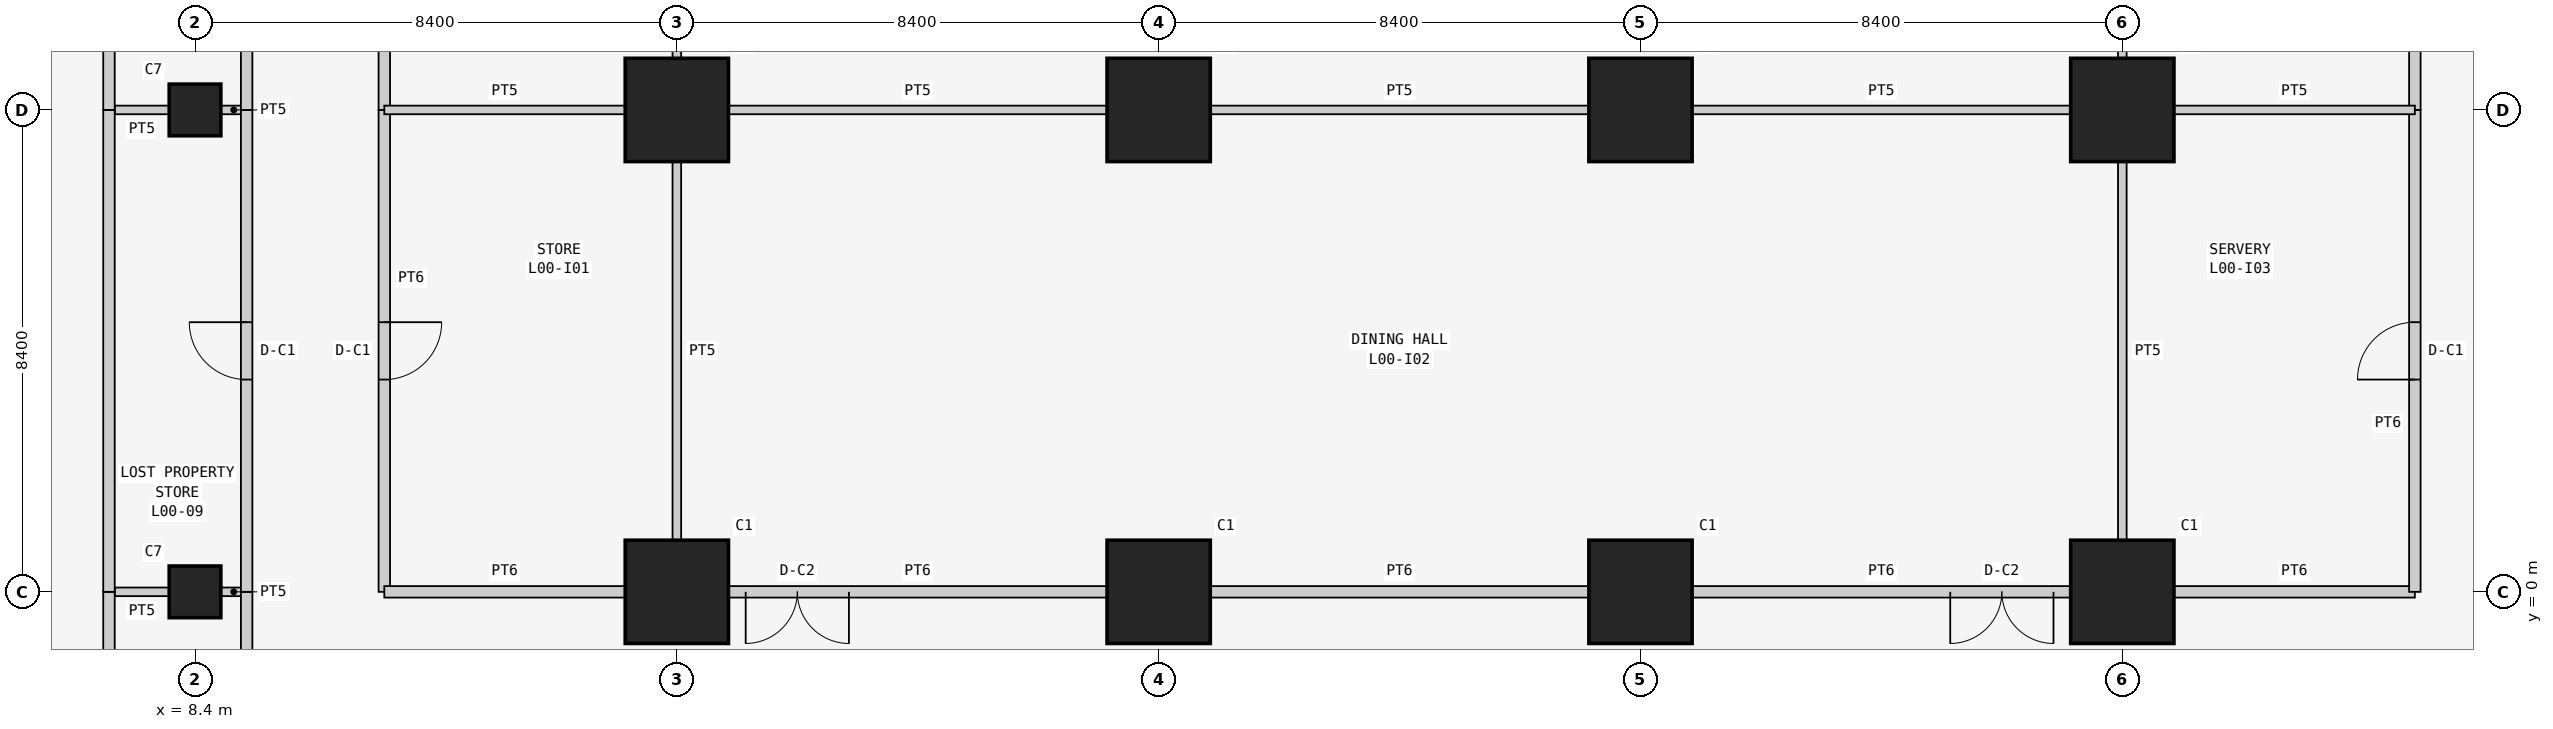
"""IFC4 building model, lengths in metres.
Left out: names, types, materials, properties, quantities, classifications, styles, units other than length and angle.
Written with IfcOpenShell. Run it as: python <this file> out.ifc"""

import sys

from ifc_helpers import new_model, si_unit, direction, frame, frame_2d, origin, origin_2d, place, context, subcontext, project, spatial, rectangle, extrude, element, fill, save


model = new_model("IFC4")
c1 = context("Model", 3, precision=1e-05, world=origin(), true_north=direction((0.0, 1.0)))
c2 = subcontext(c1, "Body", "Model", "MODEL_VIEW")
j1 = project(units=[si_unit("LENGTHUNIT", "METRE"), si_unit("PLANEANGLEUNIT", "RADIAN")], contexts=[c1])
p1 = place(None, origin())
s1 = spatial("IfcSite", under=j1, at=p1, CompositionType="ELEMENT")
p2 = place(p1, origin())
s2 = spatial("IfcBuilding", under=s1, at=p2, CompositionType="ELEMENT")
p3 = place(p2, origin())
s3 = spatial("IfcBuildingStorey", under=s2, at=p3, CompositionType="ELEMENT", Elevation=0.0)
for number, where, z_axis, x_axis in (
    (1, (8.4, 0.0, 0.0), (0.0, 0.0, 1.0), (1.0, 0.0, 0.0)),
    (2, (8.4, 8.4, 0.0), (0.0, 0.0, 1.0), (1.0, 0.0, 0.0)),
):
    element("IfcColumn", number, at=place(p3, frame(where, z_axis=z_axis, x_axis=x_axis)), inside=s3, PredefinedType="COLUMN", context=c2, shape_type="SweptSolid", body=[
        extrude(rectangle(XDim=0.9, YDim=0.9, at=origin_2d()), origin(), (0.0, 0.0, 1.0), 6.0),
    ])
for number, where, z_axis, x_axis in (
    (3, (16.8, 0.0, 0.0), (0.0, 0.0, 1.0), (1.0, 0.0, 0.0)),
    (4, (16.8, 8.4, 0.0), (0.0, 0.0, 1.0), (1.0, 0.0, 0.0)),
    (5, (25.2, 0.0, 0.0), (0.0, 0.0, 1.0), (1.0, 0.0, 0.0)),
    (6, (25.2, 8.4, 0.0), (0.0, 0.0, 1.0), (1.0, 0.0, 0.0)),
    (7, (33.6, 0.0, 0.0), (0.0, 0.0, 1.0), (1.0, 0.0, 0.0)),
    (8, (33.6, 8.4, 0.0), (0.0, 0.0, 1.0), (1.0, 0.0, 0.0)),
    (9, (42.0, 0.0, 0.0), (0.0, 0.0, 1.0), (1.0, 0.0, 0.0)),
    (10, (42.0, 8.4, 0.0), (0.0, 0.0, 1.0), (1.0, 0.0, 0.0)),
):
    element("IfcColumn", number, at=place(p3, frame(where, z_axis=z_axis, x_axis=x_axis)), inside=s3, PredefinedType="COLUMN", context=c2, shape_type="SweptSolid", body=[
        extrude(rectangle(XDim=1.8, YDim=1.8, at=origin_2d()), origin(), (0.0, 0.0, 1.0), 6.0),
    ])
p4 = place(p3, frame((7.0, 0.0, 0.0), z_axis=(0.0, 0.0, 1.0), x_axis=(1.0, 0.0, 0.0)))
e11 = element("IfcWall", 11, at=p4, inside=s3, PredefinedType="PARTITIONING", context=c2, shape_type="SweptSolid", body=[
    extrude(rectangle(XDim=0.95, YDim=0.15, at=frame_2d((0.475, 0.0))), origin(), (0.0, 0.0, 1.0), 5.043),
])
p5 = place(p3, frame((8.85, 0.0, 0.0), z_axis=(0.0, 0.0, 1.0), x_axis=(1.0, 0.0, 0.0)))
e12 = element("IfcWall", 12, at=p5, inside=s3, PredefinedType="PARTITIONING", context=c2, shape_type="SweptSolid", body=[
    extrude(rectangle(XDim=0.45, YDim=0.15, at=frame_2d((0.225, 0.0))), origin(), (0.0, 0.0, 1.0), 5.043),
])
p6 = place(p3, frame((6.9, -8.4, 0.0), z_axis=(0.0, 0.0, 1.0), x_axis=(0.0, 1.0, 0.0)))
e13 = element("IfcWall", 13, at=p6, inside=s3, PredefinedType="PARTITIONING", context=c2, shape_type="SweptSolid", body=[
    extrude(rectangle(XDim=8.4, YDim=0.2, at=frame_2d((4.2, 0.0))), origin(), (0.0, 0.0, 1.0), 5.8),
])
p7 = place(p3, frame((9.3, 0.0, 0.0), z_axis=(0.0, 0.0, 1.0), x_axis=(0.0, -1.0, 0.0)))
e14 = element("IfcWall", 14, at=p7, inside=s3, PredefinedType="PARTITIONING", context=c2, shape_type="SweptSolid", body=[
    extrude(rectangle(XDim=8.4, YDim=0.2, at=frame_2d((4.2, 0.0))), origin(), (0.0, 0.0, 1.0), 5.8),
])
p8 = place(p7, frame((3.7, 0.0, 0.0)))
e15 = element("IfcOpeningElement", 15, at=p8, cuts=e14, PredefinedType="OPENING", context=c2, shape_type="SweptSolid", body=[
    extrude(rectangle(XDim=1.0, YDim=2.1, at=frame_2d((0.5, 1.05))), frame((0.0, 0.11, 0.0), z_axis=(0.0, -1.0, 0.0), x_axis=(1.0, 0.0, 0.0)), (0.0, 0.0, 1.0), 0.22),
])
p9 = place(p3, frame((7.0, 8.4, 0.0), z_axis=(0.0, 0.0, 1.0), x_axis=(1.0, 0.0, 0.0)))
e16 = element("IfcWall", 16, at=p9, inside=s3, PredefinedType="PARTITIONING", context=c2, shape_type="SweptSolid", body=[
    extrude(rectangle(XDim=0.95, YDim=0.15, at=frame_2d((0.475, 0.0))), origin(), (0.0, 0.0, 1.0), 5.043),
])
p10 = place(p3, frame((8.85, 8.4, 0.0), z_axis=(0.0, 0.0, 1.0), x_axis=(1.0, 0.0, 0.0)))
e17 = element("IfcWall", 17, at=p10, inside=s3, PredefinedType="PARTITIONING", context=c2, shape_type="SweptSolid", body=[
    extrude(rectangle(XDim=0.45, YDim=0.15, at=frame_2d((0.225, 0.0))), origin(), (0.0, 0.0, 1.0), 5.043),
])
p11 = place(p3, frame((6.9, 0.0, 0.0), z_axis=(0.0, 0.0, 1.0), x_axis=(0.0, 1.0, 0.0)))
e18 = element("IfcWall", 18, at=p11, inside=s3, PredefinedType="PARTITIONING", context=c2, shape_type="SweptSolid", body=[
    extrude(rectangle(XDim=8.4, YDim=0.2, at=frame_2d((4.2, 0.0))), origin(), (0.0, 0.0, 1.0), 5.8),
])
p12 = place(p3, frame((9.3, 8.4, 0.0), z_axis=(0.0, 0.0, 1.0), x_axis=(0.0, -1.0, 0.0)))
e19 = element("IfcWall", 19, at=p12, inside=s3, PredefinedType="PARTITIONING", context=c2, shape_type="SweptSolid", body=[
    extrude(rectangle(XDim=8.4, YDim=0.2, at=frame_2d((4.2, 0.0))), origin(), (0.0, 0.0, 1.0), 5.8),
])
p13 = place(p12, frame((3.7, 0.0, 0.0)))
e20 = element("IfcOpeningElement", 20, at=p13, cuts=e19, PredefinedType="OPENING", context=c2, shape_type="SweptSolid", body=[
    extrude(rectangle(XDim=1.0, YDim=2.1, at=frame_2d((0.5, 1.05))), frame((0.0, 0.11, 0.0), z_axis=(0.0, -1.0, 0.0), x_axis=(1.0, 0.0, 0.0)), (0.0, 0.0, 1.0), 0.22),
])
p14 = place(p3, frame((6.9, 8.4, 0.0), z_axis=(0.0, 0.0, 1.0), x_axis=(0.0, 1.0, 0.0)))
e21 = element("IfcWall", 21, at=p14, inside=s3, PredefinedType="PARTITIONING", context=c2, shape_type="SweptSolid", body=[
    extrude(rectangle(XDim=4.9, YDim=0.2, at=frame_2d((2.45, 0.0))), origin(), (0.0, 0.0, 1.0), 5.8),
])
p15 = place(p3, frame((9.3, 15.9, 0.0), z_axis=(0.0, 0.0, 1.0), x_axis=(0.0, -1.0, 0.0)))
e22 = element("IfcWall", 22, at=p15, inside=s3, PredefinedType="PARTITIONING", context=c2, shape_type="SweptSolid", body=[
    extrude(rectangle(XDim=7.5, YDim=0.2, at=frame_2d((3.75, 0.0))), origin(), (0.0, 0.0, 1.0), 5.8),
])
p16 = place(p15, frame((3.25, 0.0, 0.0)))
e23 = element("IfcOpeningElement", 23, at=p16, cuts=e22, PredefinedType="OPENING", context=c2, shape_type="SweptSolid", body=[
    extrude(rectangle(XDim=1.0, YDim=2.1, at=frame_2d((0.5, 1.05))), frame((0.0, 0.11, 0.0), z_axis=(0.0, -1.0, 0.0), x_axis=(1.0, 0.0, 0.0)), (0.0, 0.0, 1.0), 0.22),
])
p17 = place(p3, frame((11.7, 8.4, 0.0), z_axis=(0.0, 0.0, 1.0), x_axis=(0.0, -1.0, 0.0)))
e24 = element("IfcWall", 24, at=p17, inside=s3, PredefinedType="PARTITIONING", context=c2, shape_type="SweptSolid", body=[
    extrude(rectangle(XDim=8.4, YDim=0.2, at=frame_2d((4.2, 0.0))), origin(), (0.0, 0.0, 1.0), 5.8),
])
p18 = place(p17, frame((3.7, 0.0, 0.0)))
e25 = element("IfcOpeningElement", 25, at=p18, cuts=e24, PredefinedType="OPENING", context=c2, shape_type="SweptSolid", body=[
    extrude(rectangle(XDim=1.0, YDim=2.1, at=frame_2d((0.5, 1.05))), frame((0.0, 0.11, 0.0), z_axis=(0.0, -1.0, 0.0), x_axis=(1.0, 0.0, 0.0)), (0.0, 0.0, 1.0), 0.22),
])
p19 = place(p3, frame((11.7, 0.0, 0.0), z_axis=(0.0, 0.0, 1.0), x_axis=(1.0, 0.0, 0.0)))
e26 = element("IfcWall", 26, at=p19, inside=s3, PredefinedType="PARTITIONING", context=c2, shape_type="SweptSolid", body=[
    extrude(rectangle(XDim=4.2, YDim=0.2, at=frame_2d((2.1, 0.0))), origin(), (0.0, 0.0, 1.0), 5.043),
])
p20 = place(p3, frame((17.7, 0.0, 0.0), z_axis=(0.0, 0.0, 1.0), x_axis=(1.0, 0.0, 0.0)))
e27 = element("IfcWall", 27, at=p20, inside=s3, PredefinedType="PARTITIONING", context=c2, shape_type="SweptSolid", body=[
    extrude(rectangle(XDim=6.6, YDim=0.2, at=frame_2d((3.3, 0.0))), origin(), (0.0, 0.0, 1.0), 5.043),
])
p21 = place(p20, frame((0.3, 0.0, 0.0)))
e28 = element("IfcOpeningElement", 28, at=p21, cuts=e27, PredefinedType="OPENING", context=c2, shape_type="SweptSolid", body=[
    extrude(rectangle(XDim=1.8, YDim=2.4, at=frame_2d((0.9, 1.2))), frame((0.0, 0.11, 0.0), z_axis=(0.0, -1.0, 0.0), x_axis=(1.0, 0.0, 0.0)), (0.0, 0.0, 1.0), 0.22),
])
p22 = place(p3, frame((26.1, 0.0, 0.0), z_axis=(0.0, 0.0, 1.0), x_axis=(1.0, 0.0, 0.0)))
e29 = element("IfcWall", 29, at=p22, inside=s3, PredefinedType="PARTITIONING", context=c2, shape_type="SweptSolid", body=[
    extrude(rectangle(XDim=6.6, YDim=0.2, at=frame_2d((3.3, 0.0))), origin(), (0.0, 0.0, 1.0), 5.043),
])
p23 = place(p3, frame((34.5, 0.0, 0.0), z_axis=(0.0, 0.0, 1.0), x_axis=(1.0, 0.0, 0.0)))
e30 = element("IfcWall", 30, at=p23, inside=s3, PredefinedType="PARTITIONING", context=c2, shape_type="SweptSolid", body=[
    extrude(rectangle(XDim=6.6, YDim=0.2, at=frame_2d((3.3, 0.0))), origin(), (0.0, 0.0, 1.0), 5.043),
])
p24 = place(p23, frame((4.5, 0.0, 0.0)))
e31 = element("IfcOpeningElement", 31, at=p24, cuts=e30, PredefinedType="OPENING", context=c2, shape_type="SweptSolid", body=[
    extrude(rectangle(XDim=1.8, YDim=2.4, at=frame_2d((0.9, 1.2))), frame((0.0, 0.11, 0.0), z_axis=(0.0, -1.0, 0.0), x_axis=(1.0, 0.0, 0.0)), (0.0, 0.0, 1.0), 0.22),
])
p25 = place(p3, frame((42.9, 0.0, 0.0), z_axis=(0.0, 0.0, 1.0), x_axis=(1.0, 0.0, 0.0)))
e32 = element("IfcWall", 32, at=p25, inside=s3, PredefinedType="PARTITIONING", context=c2, shape_type="SweptSolid", body=[
    extrude(rectangle(XDim=4.2, YDim=0.2, at=frame_2d((2.1, 0.0))), origin(), (0.0, 0.0, 1.0), 5.043),
])
p26 = place(p3, frame((47.1, 0.0, 0.0), z_axis=(0.0, 0.0, 1.0), x_axis=(0.0, 1.0, 0.0)))
e33 = element("IfcWall", 33, at=p26, inside=s3, PredefinedType="PARTITIONING", context=c2, shape_type="SweptSolid", body=[
    extrude(rectangle(XDim=8.4, YDim=0.2, at=frame_2d((4.2, 0.0))), origin(), (0.0, 0.0, 1.0), 5.8),
])
p27 = place(p26, frame((3.7, 0.0, 0.0)))
e34 = element("IfcOpeningElement", 34, at=p27, cuts=e33, PredefinedType="OPENING", context=c2, shape_type="SweptSolid", body=[
    extrude(rectangle(XDim=1.0, YDim=2.1, at=frame_2d((0.5, 1.05))), frame((0.0, 0.11, 0.0), z_axis=(0.0, -1.0, 0.0), x_axis=(1.0, 0.0, 0.0)), (0.0, 0.0, 1.0), 0.22),
])
p28 = place(p3, frame((11.7, 16.8, 0.0), z_axis=(0.0, 0.0, 1.0), x_axis=(0.0, -1.0, 0.0)))
e35 = element("IfcWall", 35, at=p28, inside=s3, PredefinedType="PARTITIONING", context=c2, shape_type="SweptSolid", body=[
    extrude(rectangle(XDim=8.4, YDim=0.2, at=frame_2d((4.2, 0.0))), origin(), (0.0, 0.0, 1.0), 5.8),
])
p29 = place(p28, frame((3.7, 0.0, 0.0)))
e36 = element("IfcOpeningElement", 36, at=p29, cuts=e35, PredefinedType="OPENING", context=c2, shape_type="SweptSolid", body=[
    extrude(rectangle(XDim=1.0, YDim=2.1, at=frame_2d((0.5, 1.05))), frame((0.0, 0.11, 0.0), z_axis=(0.0, -1.0, 0.0), x_axis=(1.0, 0.0, 0.0)), (0.0, 0.0, 1.0), 0.22),
])
p30 = place(p3, frame((47.1, 8.4, 0.0), z_axis=(0.0, 0.0, 1.0), x_axis=(0.0, 1.0, 0.0)))
e37 = element("IfcWall", 37, at=p30, inside=s3, PredefinedType="PARTITIONING", context=c2, shape_type="SweptSolid", body=[
    extrude(rectangle(XDim=8.4, YDim=0.2, at=frame_2d((4.2, 0.0))), origin(), (0.0, 0.0, 1.0), 5.8),
])
p31 = place(p30, frame((3.7, 0.0, 0.0)))
e38 = element("IfcOpeningElement", 38, at=p31, cuts=e37, PredefinedType="OPENING", context=c2, shape_type="SweptSolid", body=[
    extrude(rectangle(XDim=1.0, YDim=2.1, at=frame_2d((0.5, 1.05))), frame((0.0, 0.11, 0.0), z_axis=(0.0, -1.0, 0.0), x_axis=(1.0, 0.0, 0.0)), (0.0, 0.0, 1.0), 0.22),
])
p32 = place(p3, frame((16.8, 7.5, 0.0), z_axis=(0.0, 0.0, 1.0), x_axis=(0.0, -1.0, 0.0)))
e39 = element("IfcWall", 39, at=p32, inside=s3, PredefinedType="PARTITIONING", context=c2, shape_type="SweptSolid", body=[
    extrude(rectangle(XDim=6.6, YDim=0.15, at=frame_2d((3.3, 0.0))), origin(), (0.0, 0.0, 1.0), 5.043),
])
p33 = place(p3, frame((11.7, 8.4, 0.0), z_axis=(0.0, 0.0, 1.0), x_axis=(1.0, 0.0, 0.0)))
e40 = element("IfcWall", 40, at=p33, inside=s3, PredefinedType="PARTITIONING", context=c2, shape_type="SweptSolid", body=[
    extrude(rectangle(XDim=4.2, YDim=0.15, at=frame_2d((2.1, 0.0))), origin(), (0.0, 0.0, 1.0), 5.043),
])
for number, where, z_axis, x_axis in (
    (41, (42.0, 7.5, 0.0), (0.0, 0.0, 1.0), (0.0, -1.0, 0.0)),
    (42, (17.7, 8.4, 0.0), (0.0, 0.0, 1.0), (1.0, 0.0, 0.0)),
):
    element("IfcWall", number, at=place(p3, frame(where, z_axis=z_axis, x_axis=x_axis)), inside=s3, PredefinedType="PARTITIONING", context=c2, shape_type="SweptSolid", body=[
        extrude(rectangle(XDim=6.6, YDim=0.15, at=frame_2d((3.3, 0.0))), origin(), (0.0, 0.0, 1.0), 5.043),
    ])
p34 = place(p3, frame((26.1, 8.4, 0.0), z_axis=(0.0, 0.0, 1.0), x_axis=(1.0, 0.0, 0.0)))
e43 = element("IfcWall", 43, at=p34, inside=s3, PredefinedType="PARTITIONING", context=c2, shape_type="SweptSolid", body=[
    extrude(rectangle(XDim=6.6, YDim=0.15, at=frame_2d((3.3, 0.0))), origin(), (0.0, 0.0, 1.0), 5.043),
])
p35 = place(p3, frame((34.5, 8.4, 0.0), z_axis=(0.0, 0.0, 1.0), x_axis=(1.0, 0.0, 0.0)))
e44 = element("IfcWall", 44, at=p35, inside=s3, PredefinedType="PARTITIONING", context=c2, shape_type="SweptSolid", body=[
    extrude(rectangle(XDim=6.6, YDim=0.15, at=frame_2d((3.3, 0.0))), origin(), (0.0, 0.0, 1.0), 5.043),
])
p36 = place(p3, frame((42.9, 8.4, 0.0), z_axis=(0.0, 0.0, 1.0), x_axis=(1.0, 0.0, 0.0)))
e45 = element("IfcWall", 45, at=p36, inside=s3, PredefinedType="PARTITIONING", context=c2, shape_type="SweptSolid", body=[
    extrude(rectangle(XDim=4.2, YDim=0.15, at=frame_2d((2.1, 0.0))), origin(), (0.0, 0.0, 1.0), 5.043),
])
for number, where, z_axis, x_axis in (
    (46, (16.8, 15.9, 0.0), (0.0, 0.0, 1.0), (0.0, -1.0, 0.0)),
    (47, (42.0, 15.9, 0.0), (0.0, 0.0, 1.0), (0.0, -1.0, 0.0)),
):
    element("IfcWall", number, at=place(p3, frame(where, z_axis=z_axis, x_axis=x_axis)), inside=s3, PredefinedType="PARTITIONING", context=c2, shape_type="SweptSolid", body=[
        extrude(rectangle(XDim=6.6, YDim=0.15, at=frame_2d((3.3, 0.0))), origin(), (0.0, 0.0, 1.0), 5.043),
    ])
p37 = place(p13, frame((1.0, 0.0, 0.0), z_axis=(0.0, 0.0, 1.0), x_axis=(-1.0, 0.0, 0.0)))
e48 = element("IfcDoor", 48, at=p37, inside=s3, OperationType="SINGLE_SWING_RIGHT", PredefinedType="DOOR", context=c2, shape_type="SweptSolid", body=[
    extrude(rectangle(XDim=1.0, YDim=2.1, at=frame_2d((0.5, 1.05))), frame((0.0, 0.025, 0.0), z_axis=(0.0, -1.0, 0.0), x_axis=(1.0, 0.0, 0.0)), (0.0, 0.0, 1.0), 0.05),
])
fill(e20, e48)
p38 = place(p18, origin())
e49 = element("IfcDoor", 49, at=p38, inside=s3, OperationType="SINGLE_SWING_LEFT", PredefinedType="DOOR", context=c2, shape_type="SweptSolid", body=[
    extrude(rectangle(XDim=1.0, YDim=2.1, at=frame_2d((0.5, 1.05))), frame((0.0, 0.025, 0.0), z_axis=(0.0, -1.0, 0.0), x_axis=(1.0, 0.0, 0.0)), (0.0, 0.0, 1.0), 0.05),
])
fill(e25, e49)
p39 = place(p21, frame((1.8, 0.0, 0.0), z_axis=(0.0, 0.0, 1.0), x_axis=(-1.0, 0.0, 0.0)))
e50 = element("IfcDoor", 50, at=p39, inside=s3, OperationType="DOUBLE_DOOR_SINGLE_SWING", PredefinedType="DOOR", context=c2, shape_type="SweptSolid", body=[
    extrude(rectangle(XDim=1.8, YDim=2.4, at=frame_2d((0.9, 1.2))), frame((0.0, 0.025, 0.0), z_axis=(0.0, -1.0, 0.0), x_axis=(1.0, 0.0, 0.0)), (0.0, 0.0, 1.0), 0.05),
])
fill(e28, e50)
p40 = place(p24, frame((1.8, 0.0, 0.0), z_axis=(0.0, 0.0, 1.0), x_axis=(-1.0, 0.0, 0.0)))
e51 = element("IfcDoor", 51, at=p40, inside=s3, OperationType="DOUBLE_DOOR_SINGLE_SWING", PredefinedType="DOOR", context=c2, shape_type="SweptSolid", body=[
    extrude(rectangle(XDim=1.8, YDim=2.4, at=frame_2d((0.9, 1.2))), frame((0.0, 0.025, 0.0), z_axis=(0.0, -1.0, 0.0), x_axis=(1.0, 0.0, 0.0)), (0.0, 0.0, 1.0), 0.05),
])
fill(e31, e51)
p41 = place(p27, origin())
e52 = element("IfcDoor", 52, at=p41, inside=s3, OperationType="SINGLE_SWING_LEFT", PredefinedType="DOOR", context=c2, shape_type="SweptSolid", body=[
    extrude(rectangle(XDim=1.0, YDim=2.1, at=frame_2d((0.5, 1.05))), frame((0.0, 0.025, 0.0), z_axis=(0.0, -1.0, 0.0), x_axis=(1.0, 0.0, 0.0)), (0.0, 0.0, 1.0), 0.05),
])
fill(e34, e52)
save(model, sys.argv[1])
